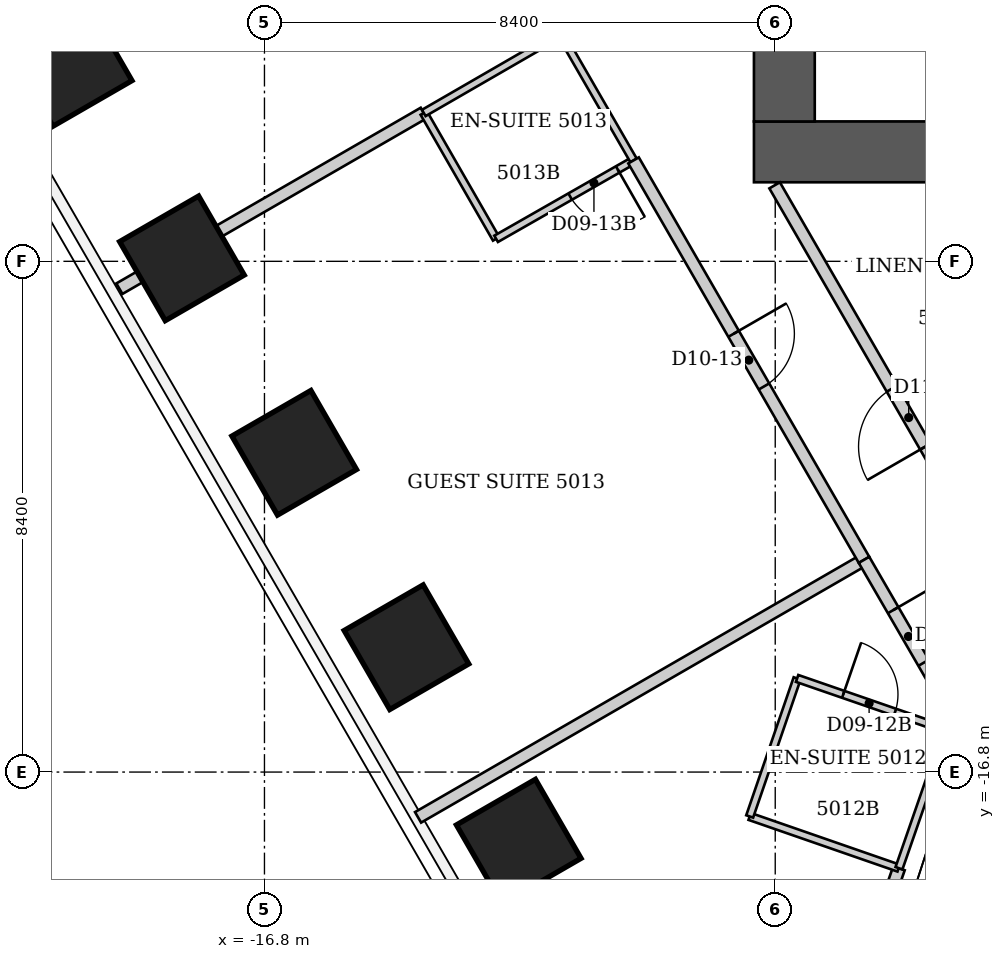
"""IFC4 building model, lengths in metres.
Left out: names, types, materials, properties, quantities, classifications, styles, units other than length and angle.
Written with IfcOpenShell. Run it as: python <this file> out.ifc"""

import sys

from ifc_helpers import new_model, si_unit, direction, frame, frame_2d, origin, origin_2d, place, context, subcontext, project, spatial, rectangle, extrude, element, fill, save


model = new_model("IFC4")
c1 = context("Model", 3, precision=1e-05, world=origin(), true_north=direction((0.0, 1.0)))
c2 = subcontext(c1, "Body", "Model", "MODEL_VIEW")
j1 = project(units=[si_unit("LENGTHUNIT", "METRE"), si_unit("PLANEANGLEUNIT", "RADIAN")], contexts=[c1])
p1 = place(None, origin())
s1 = spatial("IfcSite", under=j1, at=p1, CompositionType="ELEMENT")
p2 = place(p1, origin())
s2 = spatial("IfcBuilding", under=s1, at=p2, CompositionType="ELEMENT")
p3 = place(p2, frame((0.0, 0.0, 202.2)))
s3 = spatial("IfcBuildingStorey", under=s2, at=p3, CompositionType="ELEMENT", Elevation=202.2)
for number, where, z_axis, x_axis in (
    (1, (-12.618, -17.945, 0.0), (0.0, 0.0, 1.0), (-0.866, -0.5, 0.0)),
    (2, (-14.465, -14.747, 0.0), (0.0, 0.0, 1.0), (-0.866, -0.5, 0.0)),
    (3, (-16.311, -11.549, 0.0), (0.0, 0.0, 1.0), (-0.866, -0.5, 0.0)),
    (4, (-18.157, -8.351, 0.0), (0.0, 0.0, 1.0), (-0.866, -0.5, 0.0)),
    (5, (-20.003, -5.153, 0.0), (0.0, 0.0, 1.0), (-0.866, -0.5, 0.0)),
):
    element("IfcColumn", number, at=place(p3, frame(where, z_axis=z_axis, x_axis=x_axis)), inside=s3, PredefinedType="COLUMN", context=c2, shape_type="SweptSolid", body=[
        extrude(rectangle(XDim=1.5, YDim=1.5, at=origin_2d()), origin(), (0.0, 0.0, 1.0), 3.8),
    ])
p4 = place(p3, frame((-8.75, -6.6, 0.0), z_axis=(0.0, 0.0, 1.0), x_axis=(1.0, 0.0, 0.0)))
e6 = element("IfcWall", 6, at=p4, inside=s3, PredefinedType="SHEAR", context=c2, shape_type="SweptSolid", body=[
    extrude(rectangle(XDim=17.5, YDim=1.0, at=frame_2d((8.75, 0.0))), origin(), (0.0, 0.0, 1.0), 3.8),
])
p5 = place(p3, frame((-8.25, -6.1, 0.0), z_axis=(0.0, 0.0, 1.0), x_axis=(0.0, 1.0, 0.0)))
e7 = element("IfcWall", 7, at=p5, inside=s3, PredefinedType="SHEAR", context=c2, shape_type="SweptSolid", body=[
    extrude(rectangle(XDim=12.2, YDim=1.0, at=frame_2d((6.1, 0.0))), origin(), (0.0, 0.0, 1.0), 3.8),
])
p6 = place(p5, frame((7.6, 0.0, 0.0)))
e8 = element("IfcOpeningElement", 8, at=p6, cuts=e7, PredefinedType="OPENING", context=c2, shape_type="SweptSolid", body=[
    extrude(rectangle(XDim=1.2, YDim=2.2, at=frame_2d((0.6, 1.1))), frame((0.0, 0.5, 0.0), z_axis=(0.0, -1.0, 0.0), x_axis=(1.0, 0.0, 0.0)), (0.0, 0.0, 1.0), 1.0),
])
p7 = place(p3, frame((-19.186, -8.85, 0.0), z_axis=(0.0, 0.0, 1.0), x_axis=(0.866035778077, 0.499982030767, 0.0)))
e9 = element("IfcWall", 9, at=p7, inside=s3, PredefinedType="PARTITIONING", context=c2, shape_type="SweptSolid", body=[
    extrude(rectangle(XDim=5.781, YDim=0.2, at=frame_2d((2.89, 0.0))), origin(), (0.0, 0.0, 1.0), 3.038),
])
p8 = place(p3, frame((-14.274, -17.545, 0.0), z_axis=(0.0, 0.0, 1.0), x_axis=(0.865985626634, 0.500068889717, 0.0)))
e10 = element("IfcWall", 10, at=p8, inside=s3, PredefinedType="PARTITIONING", context=c2, shape_type="SweptSolid", body=[
    extrude(rectangle(XDim=8.459, YDim=0.2, at=frame_2d((4.229, 0.0))), origin(), (0.0, 0.0, 1.0), 3.64),
])
p9 = place(p3, frame((-14.18, -5.96, 0.0), z_axis=(0.0, 0.0, 1.0), x_axis=(0.49836161924, -0.866969259241, 0.0)))
e11 = element("IfcWall", 11, at=p9, inside=s3, PredefinedType="PARTITIONING", context=c2, shape_type="SweptSolid", body=[
    extrude(rectangle(XDim=2.388, YDim=0.12, at=frame_2d((1.194, 0.0))), origin(), (0.0, 0.0, 1.0), 3.64),
])
p10 = place(p3, frame((-14.18, -5.96, 0.0), z_axis=(0.0, 0.0, 1.0), x_axis=(0.865856933682, 0.500291685314, 0.0)))
e12 = element("IfcWall", 12, at=p10, inside=s3, PredefinedType="PARTITIONING", context=c2, shape_type="SweptSolid", body=[
    extrude(rectangle(XDim=2.599, YDim=0.12, at=frame_2d((1.299, 0.0))), origin(), (0.0, 0.0, 1.0), 3.038),
])
p11 = place(p3, frame((-12.99, -8.03, 0.0), z_axis=(0.0, 0.0, 1.0), x_axis=(0.868473984885, 0.49573474518, 0.0)))
e13 = element("IfcWall", 13, at=p11, inside=s3, PredefinedType="PARTITIONING", context=c2, shape_type="SweptSolid", body=[
    extrude(rectangle(XDim=2.602, YDim=0.12, at=frame_2d((1.301, 0.0))), origin(), (0.0, 0.0, 1.0), 3.64),
])
p12 = place(p11, frame((1.402, 0.0, 0.0)))
e14 = element("IfcOpeningElement", 14, at=p12, cuts=e13, PredefinedType="OPENING", context=c2, shape_type="SweptSolid", body=[
    extrude(rectangle(XDim=0.9, YDim=2.03, at=frame_2d((0.45, 1.015))), frame((0.0, 0.06, 0.0), z_axis=(0.0, -1.0, 0.0), x_axis=(1.0, 0.0, 0.0)), (0.0, 0.0, 1.0), 0.12),
])
p13 = place(p3, frame((-11.93, -4.66, 0.0), z_axis=(0.0, 0.0, 1.0), x_axis=(0.499693115345, -0.866202511239, 0.0)))
e15 = element("IfcWall", 15, at=p13, inside=s3, PredefinedType="PARTITIONING", context=c2, shape_type="SweptSolid", body=[
    extrude(rectangle(XDim=2.401, YDim=0.12, at=frame_2d((1.201, 0.0))), origin(), (0.0, 0.0, 1.0), 3.64),
])
p14 = place(p3, frame((-10.73, -6.74, 0.0), z_axis=(0.0, 0.0, 1.0), x_axis=(0.499684370586, -0.866207555839, 0.0)))
e16 = element("IfcWall", 16, at=p14, inside=s3, PredefinedType="PARTITIONING", context=c2, shape_type="SweptSolid", body=[
    extrude(rectangle(XDim=7.585, YDim=0.2, at=frame_2d((3.792, 0.0))), origin(), (0.0, 0.0, 1.0), 3.64),
])
p15 = place(p14, frame((3.292, 0.0, 0.0)))
e17 = element("IfcOpeningElement", 17, at=p15, cuts=e16, PredefinedType="OPENING", context=c2, shape_type="SweptSolid", body=[
    extrude(rectangle(XDim=1.0, YDim=2.13, at=frame_2d((0.5, 1.065))), frame((0.0, 0.1, 0.0), z_axis=(0.0, -1.0, 0.0), x_axis=(1.0, 0.0, 0.0)), (0.0, 0.0, 1.0), 0.2),
])
p16 = place(p3, frame((-9.01, -26.012, 0.0), z_axis=(0.0, 0.0, 1.0), x_axis=(0.32759647282, 0.944817734272, 0.0)))
e18 = element("IfcWall", 18, at=p16, inside=s3, PredefinedType="PARTITIONING", context=c2, shape_type="SweptSolid", body=[
    extrude(rectangle(XDim=8.075, YDim=0.2, at=frame_2d((4.038, 0.0))), origin(), (0.0, 0.0, 1.0), 3.64),
])
p17 = place(p3, frame((-8.82, -17.53, 0.0), z_axis=(0.0, 0.0, 1.0), x_axis=(0.944753042377, -0.327782990589, 0.0)))
e19 = element("IfcWall", 19, at=p17, inside=s3, PredefinedType="PARTITIONING", context=c2, shape_type="SweptSolid", body=[
    extrude(rectangle(XDim=2.594, YDim=0.12, at=frame_2d((1.297, 0.0))), origin(), (0.0, 0.0, 1.0), 3.64),
])
p18 = place(p3, frame((-8.04, -15.26, 0.0), z_axis=(0.0, 0.0, 1.0), x_axis=(-0.324971746724, -0.945723724896, 0.0)))
e20 = element("IfcWall", 20, at=p18, inside=s3, PredefinedType="PARTITIONING", context=c2, shape_type="SweptSolid", body=[
    extrude(rectangle(XDim=2.4, YDim=0.12, at=frame_2d((1.2, 0.0))), origin(), (0.0, 0.0, 1.0), 3.64),
])
p19 = place(p3, frame((-6.94, -13.31, 0.0), z_axis=(0.0, 0.0, 1.0), x_axis=(0.501293994647, -0.865277025542, 0.0)))
e21 = element("IfcWall", 21, at=p19, inside=s3, PredefinedType="PARTITIONING", context=c2, shape_type="SweptSolid", body=[
    extrude(rectangle(XDim=2.912, YDim=0.2, at=frame_2d((1.456, 0.0))), origin(), (0.0, 0.0, 1.0), 3.64),
])
p20 = place(p19, frame((0.956, 0.0, 0.0)))
e22 = element("IfcOpeningElement", 22, at=p20, cuts=e21, PredefinedType="OPENING", context=c2, shape_type="SweptSolid", body=[
    extrude(rectangle(XDim=1.0, YDim=2.13, at=frame_2d((0.5, 1.065))), frame((0.0, 0.1, 0.0), z_axis=(0.0, -1.0, 0.0), x_axis=(1.0, 0.0, 0.0)), (0.0, 0.0, 1.0), 0.2),
])
p21 = place(p3, frame((-6.365, -18.382, 0.0), z_axis=(0.0, 0.0, 1.0), x_axis=(0.327571022417, 0.944826558302, 0.0)))
e23 = element("IfcWall", 23, at=p21, inside=s3, PredefinedType="PARTITIONING", context=c2, shape_type="SweptSolid", body=[
    extrude(rectangle(XDim=2.404, YDim=0.12, at=frame_2d((1.202, 0.0))), origin(), (0.0, 0.0, 1.0), 3.64),
])
p22 = place(p3, frame((-5.58, -16.11, 0.0), z_axis=(0.0, 0.0, 1.0), x_axis=(-0.94515546045, 0.326620813149, 0.0)))
e24 = element("IfcWall", 24, at=p22, inside=s3, PredefinedType="PARTITIONING", context=c2, shape_type="SweptSolid", body=[
    extrude(rectangle(XDim=2.603, YDim=0.12, at=frame_2d((1.301, 0.0))), origin(), (0.0, 0.0, 1.0), 3.64),
])
p23 = place(p22, frame((0.9, 0.0, 0.0)))
e25 = element("IfcOpeningElement", 25, at=p23, cuts=e24, PredefinedType="OPENING", context=c2, shape_type="SweptSolid", body=[
    extrude(rectangle(XDim=0.9, YDim=2.03, at=frame_2d((0.45, 1.015))), frame((0.0, 0.06, 0.0), z_axis=(0.0, -1.0, 0.0), x_axis=(1.0, 0.0, 0.0)), (0.0, 0.0, 1.0), 0.12),
])
p24 = place(p3, frame((-4.0, -14.79, 0.0), z_axis=(0.0, 0.0, 1.0), x_axis=(-0.499916512745, 0.866073599808, 0.0)))
e26 = element("IfcWall", 26, at=p24, inside=s3, PredefinedType="PARTITIONING", context=c2, shape_type="SweptSolid", body=[
    extrude(rectangle(XDim=8.821, YDim=0.2, at=frame_2d((4.411, 0.0))), origin(), (0.0, 0.0, 1.0), 3.64),
])
p25 = place(p24, frame((3.861, 0.0, 0.0)))
e27 = element("IfcOpeningElement", 27, at=p25, cuts=e26, PredefinedType="OPENING", context=c2, shape_type="SweptSolid", body=[
    extrude(rectangle(XDim=1.1, YDim=2.2, at=frame_2d((0.55, 1.1))), frame((0.0, 0.1, 0.0), z_axis=(0.0, -1.0, 0.0), x_axis=(1.0, 0.0, 0.0)), (0.0, 0.0, 1.0), 0.2),
])
p26 = place(p20, origin())
e28 = element("IfcDoor", 28, at=p26, inside=s3, OperationType="SINGLE_SWING_LEFT", PredefinedType="DOOR", context=c2, shape_type="SweptSolid", body=[
    extrude(rectangle(XDim=1.0, YDim=2.13, at=frame_2d((0.5, 1.065))), frame((0.0, 0.025, 0.0), z_axis=(0.0, -1.0, 0.0), x_axis=(1.0, 0.0, 0.0)), (0.0, 0.0, 1.0), 0.05),
])
fill(e22, e28)
p27 = place(p23, origin())
e29 = element("IfcDoor", 29, at=p27, inside=s3, OperationType="SINGLE_SWING_RIGHT", PredefinedType="DOOR", context=c2, shape_type="SweptSolid", body=[
    extrude(rectangle(XDim=0.9, YDim=2.03, at=frame_2d((0.45, 1.015))), frame((0.0, 0.025, 0.0), z_axis=(0.0, -1.0, 0.0), x_axis=(1.0, 0.0, 0.0)), (0.0, 0.0, 1.0), 0.05),
])
fill(e25, e29)
p28 = place(p15, origin())
e30 = element("IfcDoor", 30, at=p28, inside=s3, OperationType="SINGLE_SWING_LEFT", PredefinedType="DOOR", context=c2, shape_type="SweptSolid", body=[
    extrude(rectangle(XDim=1.0, YDim=2.13, at=frame_2d((0.5, 1.065))), frame((0.0, 0.025, 0.0), z_axis=(0.0, -1.0, 0.0), x_axis=(1.0, 0.0, 0.0)), (0.0, 0.0, 1.0), 0.05),
])
fill(e17, e30)
p29 = place(p12, origin())
e31 = element("IfcDoor", 31, at=p29, inside=s3, OperationType="SINGLE_SWING_RIGHT", PredefinedType="DOOR", context=c2, shape_type="SweptSolid", body=[
    extrude(rectangle(XDim=0.9, YDim=2.03, at=frame_2d((0.45, 1.015))), frame((0.0, 0.025, 0.0), z_axis=(0.0, -1.0, 0.0), x_axis=(1.0, 0.0, 0.0)), (0.0, 0.0, 1.0), 0.05),
])
fill(e14, e31)
p30 = place(p25, origin())
e32 = element("IfcDoor", 32, at=p30, inside=s3, OperationType="SINGLE_SWING_LEFT", PredefinedType="DOOR", context=c2, shape_type="SweptSolid", body=[
    extrude(rectangle(XDim=1.1, YDim=2.2, at=frame_2d((0.55, 1.1))), frame((0.0, 0.025, 0.0), z_axis=(0.0, -1.0, 0.0), x_axis=(1.0, 0.0, 0.0)), (0.0, 0.0, 1.0), 0.05),
])
fill(e27, e32)
save(model, sys.argv[1])
